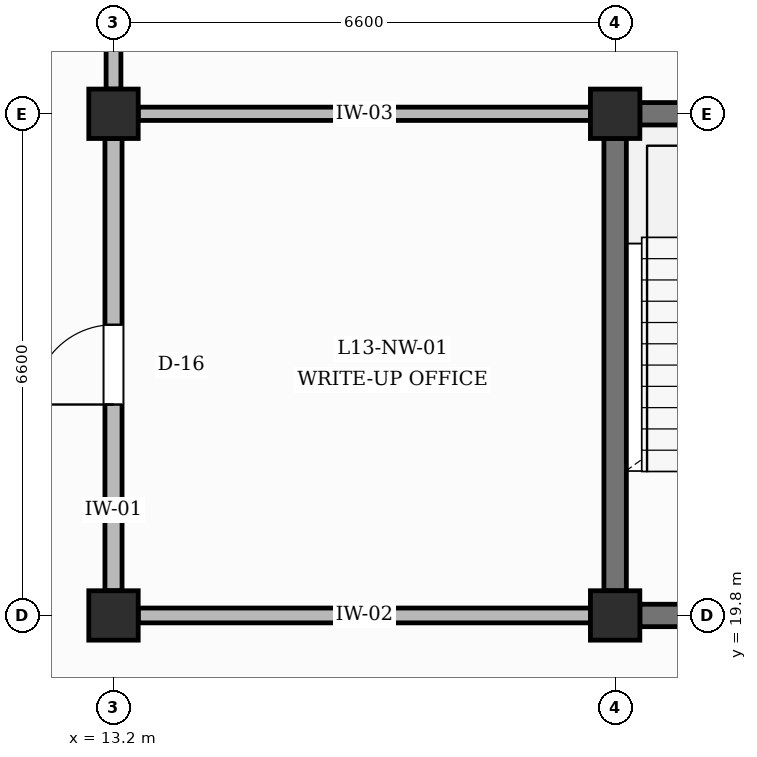
"""IFC4 building model, lengths in metres.
Left out: names, types, materials, properties, quantities, classifications, styles, units other than length and angle.
Written with IfcOpenShell. Run it as: python <this file> out.ifc"""

import sys

from ifc_helpers import new_model, si_unit, direction, frame, frame_2d, origin, origin_2d, place, context, subcontext, project, spatial, rectangle, extrude, element, fill, save


model = new_model("IFC4")
c1 = context("Model", 3, precision=1e-05, world=origin(), true_north=direction((0.0, 1.0)))
c2 = subcontext(c1, "Body", "Model", "MODEL_VIEW")
j1 = project(units=[si_unit("LENGTHUNIT", "METRE"), si_unit("PLANEANGLEUNIT", "RADIAN")], contexts=[c1])
p1 = place(None, origin())
s1 = spatial("IfcSite", under=j1, at=p1, CompositionType="ELEMENT")
p2 = place(p1, origin())
s2 = spatial("IfcBuilding", under=s1, at=p2, CompositionType="ELEMENT")
p3 = place(p2, frame((0.0, 0.0, 56.4)))
s3 = spatial("IfcBuildingStorey", under=s2, at=p3, CompositionType="ELEMENT", Elevation=56.4)
for number, where, z_axis, x_axis in (
    (1, (13.2, 19.8, 0.0), (0.0, 0.0, 1.0), (1.0, 0.0, 0.0)),
    (2, (13.2, 26.4, 0.0), (0.0, 0.0, 1.0), (1.0, 0.0, 0.0)),
    (3, (19.8, 19.8, 0.0), (0.0, 0.0, 1.0), (1.0, 0.0, 0.0)),
    (4, (19.8, 26.4, 0.0), (0.0, 0.0, 1.0), (1.0, 0.0, 0.0)),
):
    element("IfcColumn", number, at=place(p3, frame(where, z_axis=z_axis, x_axis=x_axis)), inside=s3, PredefinedType="COLUMN", context=c2, shape_type="SweptSolid", body=[
        extrude(rectangle(XDim=0.65, YDim=0.65, at=origin_2d()), origin(), (0.0, 0.0, 1.0), 4.2),
    ])
p4 = place(p3, frame((20.125, 19.8, 0.0), z_axis=(0.0, 0.0, 1.0), x_axis=(1.0, 0.0, 0.0)))
e5 = element("IfcWall", 5, at=p4, inside=s3, PredefinedType="SHEAR", context=c2, shape_type="SweptSolid", body=[
    extrude(rectangle(XDim=5.95, YDim=0.295, at=frame_2d((2.975, 0.0))), origin(), (0.0, 0.0, 1.0), 3.3),
])
p5 = place(p4, frame((2.425, 0.0, 0.0)))
e6 = element("IfcOpeningElement", 6, at=p5, cuts=e5, PredefinedType="OPENING", context=c2, shape_type="SweptSolid", body=[
    extrude(rectangle(XDim=1.1, YDim=2.15, at=frame_2d((0.55, 1.075))), frame((0.0, 0.157, 0.0), z_axis=(0.0, -1.0, 0.0), x_axis=(1.0, 0.0, 0.0)), (0.0, 0.0, 1.0), 0.315),
])
for number, where, z_axis, x_axis in (
    (7, (20.125, 26.4, 0.0), (0.0, 0.0, 1.0), (1.0, 0.0, 0.0)),
    (8, (19.8, 20.125, 0.0), (0.0, 0.0, 1.0), (0.0, 1.0, 0.0)),
):
    element("IfcWall", number, at=place(p3, frame(where, z_axis=z_axis, x_axis=x_axis)), inside=s3, PredefinedType="SHEAR", context=c2, shape_type="SweptSolid", body=[
        extrude(rectangle(XDim=5.95, YDim=0.295, at=frame_2d((2.975, 0.0))), origin(), (0.0, 0.0, 1.0), 3.3),
    ])
p6 = place(p3, frame((13.2, 20.125, 0.0), z_axis=(0.0, 0.0, 1.0), x_axis=(0.0, 1.0, 0.0)))
e9 = element("IfcWall", 9, at=p6, inside=s3, PredefinedType="PARTITIONING", context=c2, shape_type="SweptSolid", body=[
    extrude(rectangle(XDim=5.95, YDim=0.225, at=frame_2d((2.975, 0.0))), origin(), (0.0, 0.0, 1.0), 3.3),
])
p7 = place(p6, frame((2.45, 0.0, 0.0)))
e10 = element("IfcOpeningElement", 10, at=p7, cuts=e9, PredefinedType="OPENING", context=c2, shape_type="SweptSolid", body=[
    extrude(rectangle(XDim=1.05, YDim=2.15, at=frame_2d((0.525, 1.075))), frame((0.0, 0.123, 0.0), z_axis=(0.0, -1.0, 0.0), x_axis=(1.0, 0.0, 0.0)), (0.0, 0.0, 1.0), 0.245),
])
p8 = place(p3, frame((13.2, 26.725, 0.0), z_axis=(0.0, 0.0, 1.0), x_axis=(0.0, 1.0, 0.0)))
e11 = element("IfcWall", 11, at=p8, inside=s3, PredefinedType="PARTITIONING", context=c2, shape_type="SweptSolid", body=[
    extrude(rectangle(XDim=5.95, YDim=0.195, at=frame_2d((2.975, 0.0))), origin(), (0.0, 0.0, 1.0), 3.3),
])
p9 = place(p8, frame((2.275, 0.0, 0.0)))
e12 = element("IfcOpeningElement", 12, at=p9, cuts=e11, PredefinedType="OPENING", context=c2, shape_type="SweptSolid", body=[
    extrude(rectangle(XDim=1.4, YDim=2.25, at=frame_2d((0.7, 1.125))), frame((0.0, 0.107, 0.0), z_axis=(0.0, -1.0, 0.0), x_axis=(1.0, 0.0, 0.0)), (0.0, 0.0, 1.0), 0.215),
])
p10 = place(p3, frame((13.525, 19.8, 0.0), z_axis=(0.0, 0.0, 1.0), x_axis=(1.0, 0.0, 0.0)))
e13 = element("IfcWall", 13, at=p10, inside=s3, PredefinedType="PARTITIONING", context=c2, shape_type="SweptSolid", body=[
    extrude(rectangle(XDim=5.95, YDim=0.195, at=frame_2d((2.975, 0.0))), origin(), (0.0, 0.0, 1.0), 3.3),
])
p11 = place(p3, frame((13.525, 26.4, 0.0), z_axis=(0.0, 0.0, 1.0), x_axis=(1.0, 0.0, 0.0)))
e14 = element("IfcWall", 14, at=p11, inside=s3, PredefinedType="PARTITIONING", context=c2, shape_type="SweptSolid", body=[
    extrude(rectangle(XDim=5.95, YDim=0.175, at=frame_2d((2.975, 0.0))), origin(), (0.0, 0.0, 1.0), 3.3),
])
p12 = place(p7, origin())
e15 = element("IfcDoor", 15, at=p12, inside=s3, OperationType="SINGLE_SWING_LEFT", PredefinedType="DOOR", context=c2, shape_type="SweptSolid", body=[
    extrude(rectangle(XDim=1.05, YDim=2.15, at=frame_2d((0.525, 1.075))), frame((0.0, 0.025, 0.0), z_axis=(0.0, -1.0, 0.0), x_axis=(1.0, 0.0, 0.0)), (0.0, 0.0, 1.0), 0.05),
])
fill(e10, e15)
save(model, sys.argv[1])
